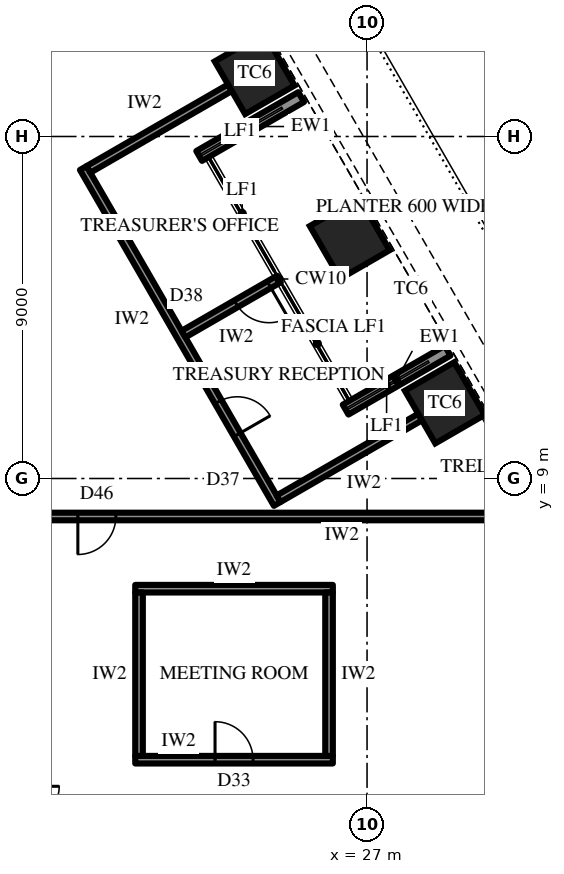
"""IFC4 building model, lengths in metres.
Left out: names, types, materials, properties, quantities, classifications, styles, units other than length and angle.
Written with IfcOpenShell. Run it as: python <this file> out.ifc"""

import sys

from ifc_helpers import new_model, si_unit, direction, frame, frame_2d, origin, origin_2d, place, context, subcontext, project, spatial, rectangle, extrude, element, fill, save


model = new_model("IFC4")
c1 = context("Model", 3, precision=1e-05, world=origin(), true_north=direction((0.0, 1.0)))
c2 = subcontext(c1, "Body", "Model", "MODEL_VIEW")
j1 = project(units=[si_unit("LENGTHUNIT", "METRE"), si_unit("PLANEANGLEUNIT", "RADIAN")], contexts=[c1])
p1 = place(None, origin())
s1 = spatial("IfcSite", under=j1, at=p1, CompositionType="ELEMENT")
p2 = place(p1, origin())
s2 = spatial("IfcBuilding", under=s1, at=p2, CompositionType="ELEMENT")
p3 = place(p2, frame((0.0, 0.0, 140.5)))
s3 = spatial("IfcBuildingStorey", under=s2, at=p3, CompositionType="ELEMENT", Elevation=140.5)
for number, where, z_axis, x_axis in (
    (1, (29.045, 10.992, 0.0), (0.0, 0.0, 1.0), (-0.5, 0.866, 0.0)),
    (2, (26.544, 15.325, 0.0), (0.0, 0.0, 1.0), (-0.5, 0.866, 0.0)),
    (3, (24.042, 19.658, 0.0), (0.0, 0.0, 1.0), (-0.5, 0.866, 0.0)),
):
    element("IfcColumn", number, at=place(p3, frame(where, z_axis=z_axis, x_axis=x_axis)), inside=s3, PredefinedType="COLUMN", context=c2, shape_type="SweptSolid", body=[
        extrude(rectangle(XDim=1.6, YDim=1.5, at=origin_2d()), origin(), (0.0, 0.0, 1.0), 4.2),
    ])
p4 = place(p3, frame((29.12, 12.363, 0.0), z_axis=(0.0, 0.0, 1.0), x_axis=(-0.86602952684, -0.49999285859, 0.0)))
e4 = element("IfcWall", 4, at=p4, inside=s3, PredefinedType="SOLIDWALL", context=c2, shape_type="SweptSolid", body=[
    extrude(rectangle(XDim=3.1, YDim=0.3, at=frame_2d((1.55, 0.0))), origin(), (0.0, 0.0, 1.0), 2.75),
])
p5 = place(p3, frame((25.266, 19.037, 0.0), z_axis=(0.0, 0.0, 1.0), x_axis=(-0.86600983753, -0.500026960575, 0.0)))
e5 = element("IfcWall", 5, at=p5, inside=s3, PredefinedType="SOLIDWALL", context=c2, shape_type="SweptSolid", body=[
    extrude(rectangle(XDim=3.1, YDim=0.3, at=frame_2d((1.55, 0.0))), origin(), (0.0, 0.0, 1.0), 2.75),
])
p6 = place(p3, frame((24.635, 8.33, 0.0), z_axis=(0.0, 0.0, 1.0), x_axis=(-0.500005407604, 0.86602228168, 0.0)))
e6 = element("IfcWall", 6, at=p6, inside=s3, PredefinedType="PARTITIONING", context=c2, shape_type="SweptSolid", body=[
    extrude(rectangle(XDim=10.208, YDim=0.2, at=frame_2d((5.104, 0.0))), origin(), (0.0, 0.0, 1.0), 4.0),
])
p7 = place(p6, frame((2.102, 0.0, 0.0)))
e7 = element("IfcOpeningElement", 7, at=p7, cuts=e6, PredefinedType="OPENING", context=c2, shape_type="SweptSolid", body=[
    extrude(rectangle(XDim=1.0, YDim=2.2, at=frame_2d((0.5, 1.1))), frame((0.0, 0.11, 0.0), z_axis=(0.0, -1.0, 0.0), x_axis=(1.0, 0.0, 0.0)), (0.0, 0.0, 1.0), 0.22),
])
p8 = place(p3, frame((24.672, 8.467, 0.0), z_axis=(0.0, 0.0, 1.0), x_axis=(0.866008775485, 0.500028799954, 0.0)))
e8 = element("IfcWall", 8, at=p8, inside=s3, PredefinedType="PARTITIONING", context=c2, shape_type="SweptSolid", body=[
    extrude(rectangle(XDim=4.3, YDim=0.2, at=frame_2d((2.15, 0.0))), origin(), (0.0, 0.0, 1.0), 3.082),
])
p9 = place(p3, frame((22.17, 12.8, 0.0), z_axis=(0.0, 0.0, 1.0), x_axis=(0.866044046824, 0.499967707918, 0.0)))
e9 = element("IfcWall", 9, at=p9, inside=s3, PredefinedType="PARTITIONING", context=c2, shape_type="SweptSolid", body=[
    extrude(rectangle(XDim=2.901, YDim=0.2, at=frame_2d((1.451, 0.0))), origin(), (0.0, 0.0, 1.0), 4.0),
])
p10 = place(p9, frame((1.6, 0.0, 0.0)))
e10 = element("IfcOpeningElement", 10, at=p10, cuts=e9, PredefinedType="OPENING", context=c2, shape_type="SweptSolid", body=[
    extrude(rectangle(XDim=1.0, YDim=2.2, at=frame_2d((0.5, 1.1))), frame((0.0, 0.11, 0.0), z_axis=(0.0, -1.0, 0.0), x_axis=(1.0, 0.0, 0.0)), (0.0, 0.0, 1.0), 0.22),
])
p11 = place(p3, frame((19.668, 17.133, 0.0), z_axis=(0.0, 0.0, 1.0), x_axis=(0.866008775485, 0.500028799954, 0.0)))
e11 = element("IfcWall", 11, at=p11, inside=s3, PredefinedType="PARTITIONING", context=c2, shape_type="SweptSolid", body=[
    extrude(rectangle(XDim=4.3, YDim=0.2, at=frame_2d((2.15, 0.0))), origin(), (0.0, 0.0, 1.0), 3.082),
])
p12 = place(p3, frame((20.9, 1.6, 0.0), z_axis=(0.0, 0.0, 1.0), x_axis=(1.0, 0.0, 0.0)))
e12 = element("IfcWall", 12, at=p12, inside=s3, PredefinedType="PARTITIONING", context=c2, shape_type="SweptSolid", body=[
    extrude(rectangle(XDim=5.2, YDim=0.2, at=frame_2d((2.6, 0.0))), origin(), (0.0, 0.0, 1.0), 4.0),
])
p13 = place(p12, frame((2.1, 0.0, 0.0)))
e13 = element("IfcOpeningElement", 13, at=p13, cuts=e12, PredefinedType="OPENING", context=c2, shape_type="SweptSolid", body=[
    extrude(rectangle(XDim=1.0, YDim=2.2, at=frame_2d((0.5, 1.1))), frame((0.0, 0.11, 0.0), z_axis=(0.0, -1.0, 0.0), x_axis=(1.0, 0.0, 0.0)), (0.0, 0.0, 1.0), 0.22),
])
p14 = place(p3, frame((20.9, 6.1, 0.0), z_axis=(0.0, 0.0, 1.0), x_axis=(1.0, 0.0, 0.0)))
e14 = element("IfcWall", 14, at=p14, inside=s3, PredefinedType="PARTITIONING", context=c2, shape_type="SweptSolid", body=[
    extrude(rectangle(XDim=5.2, YDim=0.2, at=frame_2d((2.6, 0.0))), origin(), (0.0, 0.0, 1.0), 4.0),
])
for number, where, z_axis, x_axis in (
    (15, (21.0, 1.7, 0.0), (0.0, 0.0, 1.0), (0.0, 1.0, 0.0)),
    (16, (26.0, 1.7, 0.0), (0.0, 0.0, 1.0), (0.0, 1.0, 0.0)),
):
    element("IfcWall", number, at=place(p3, frame(where, z_axis=z_axis, x_axis=x_axis)), inside=s3, PredefinedType="PARTITIONING", context=c2, shape_type="SweptSolid", body=[
        extrude(rectangle(XDim=4.3, YDim=0.2, at=frame_2d((2.15, 0.0))), origin(), (0.0, 0.0, 1.0), 4.0),
    ])
p15 = place(p3, frame((18.6, 8.0, 0.0), z_axis=(0.0, 0.0, 1.0), x_axis=(1.0, 0.0, 0.0)))
e17 = element("IfcWall", 17, at=p15, inside=s3, PredefinedType="PARTITIONING", context=c2, shape_type="SweptSolid", body=[
    extrude(rectangle(XDim=12.9, YDim=0.2, at=frame_2d((6.45, 0.0))), origin(), (0.0, 0.0, 1.0), 4.0),
])
p16 = place(p15, frame((0.79, 0.0, 0.0)))
e18 = element("IfcOpeningElement", 18, at=p16, cuts=e17, PredefinedType="OPENING", context=c2, shape_type="SweptSolid", body=[
    extrude(rectangle(XDim=1.0, YDim=2.2, at=frame_2d((0.5, 1.1))), frame((0.0, 0.11, 0.0), z_axis=(0.0, -1.0, 0.0), x_axis=(1.0, 0.0, 0.0)), (0.0, 0.0, 1.0), 0.22),
])
p17 = place(p7, frame((1.0, 0.0, 0.0), z_axis=(0.0, 0.0, 1.0), x_axis=(-1.0, 0.0, 0.0)))
e19 = element("IfcDoor", 19, at=p17, inside=s3, OperationType="SINGLE_SWING_LEFT", PredefinedType="DOOR", context=c2, shape_type="SweptSolid", body=[
    extrude(rectangle(XDim=1.0, YDim=2.2, at=frame_2d((0.5, 1.1))), frame((0.0, 0.025, 0.0), z_axis=(0.0, -1.0, 0.0), x_axis=(1.0, 0.0, 0.0)), (0.0, 0.0, 1.0), 0.05),
])
fill(e7, e19)
p18 = place(p10, frame((1.0, 0.0, 0.0), z_axis=(0.0, 0.0, 1.0), x_axis=(-1.0, 0.0, 0.0)))
e20 = element("IfcDoor", 20, at=p18, inside=s3, OperationType="SINGLE_SWING_RIGHT", PredefinedType="DOOR", context=c2, shape_type="SweptSolid", body=[
    extrude(rectangle(XDim=1.0, YDim=2.2, at=frame_2d((0.5, 1.1))), frame((0.0, 0.025, 0.0), z_axis=(0.0, -1.0, 0.0), x_axis=(1.0, 0.0, 0.0)), (0.0, 0.0, 1.0), 0.05),
])
fill(e10, e20)
p19 = place(p13, origin())
e21 = element("IfcDoor", 21, at=p19, inside=s3, OperationType="SINGLE_SWING_RIGHT", PredefinedType="DOOR", context=c2, shape_type="SweptSolid", body=[
    extrude(rectangle(XDim=1.0, YDim=2.2, at=frame_2d((0.5, 1.1))), frame((0.0, 0.025, 0.0), z_axis=(0.0, -1.0, 0.0), x_axis=(1.0, 0.0, 0.0)), (0.0, 0.0, 1.0), 0.05),
])
fill(e13, e21)
p20 = place(p16, frame((1.0, 0.0, 0.0), z_axis=(0.0, 0.0, 1.0), x_axis=(-1.0, 0.0, 0.0)))
e22 = element("IfcDoor", 22, at=p20, inside=s3, OperationType="SINGLE_SWING_LEFT", PredefinedType="DOOR", context=c2, shape_type="SweptSolid", body=[
    extrude(rectangle(XDim=1.0, YDim=2.2, at=frame_2d((0.5, 1.1))), frame((0.0, 0.025, 0.0), z_axis=(0.0, -1.0, 0.0), x_axis=(1.0, 0.0, 0.0)), (0.0, 0.0, 1.0), 0.05),
])
fill(e18, e22)
save(model, sys.argv[1])
